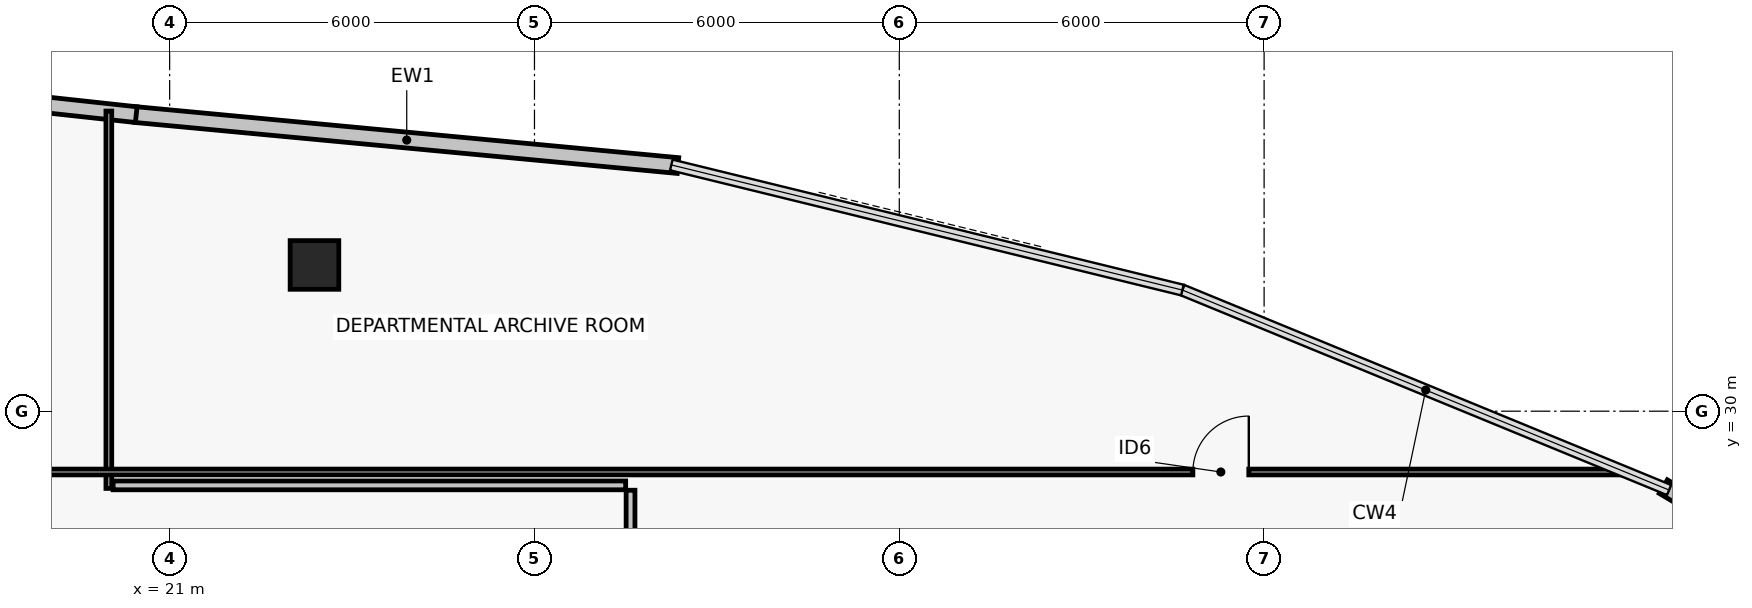
"""IFC4 building model, lengths in metres.
Left out: names, types, materials, properties, quantities, classifications, styles, units other than length and angle.
Written with IfcOpenShell. Run it as: python <this file> out.ifc"""

import sys

from ifc_helpers import new_model, si_unit, direction, frame, frame_2d, origin, origin_2d, place, context, subcontext, project, spatial, rectangle, hollow_rectangle, extrude, element, fill, save


model = new_model("IFC4")
c1 = context("Model", 3, precision=1e-05, world=origin(), true_north=direction((0.0, 1.0)))
c2 = subcontext(c1, "Body", "Model", "MODEL_VIEW")
j1 = project(units=[si_unit("LENGTHUNIT", "METRE"), si_unit("PLANEANGLEUNIT", "RADIAN")], contexts=[c1])
p1 = place(None, origin())
s1 = spatial("IfcSite", under=j1, at=p1, CompositionType="ELEMENT")
p2 = place(p1, origin())
s2 = spatial("IfcBuilding", under=s1, at=p2, CompositionType="ELEMENT")
p3 = place(p2, frame((0.0, 0.0, 234.42)))
s3 = spatial("IfcBuildingStorey", under=s2, at=p3, CompositionType="ELEMENT", Elevation=234.42)
p4 = place(p3, frame((23.382, 32.405, 0.0), z_axis=(0.0, 0.0, 1.0), x_axis=(1.0, 0.0, 0.0)))
e1 = element("IfcColumn", 1, at=p4, inside=s3, PredefinedType="COLUMN", context=c2, shape_type="SweptSolid", body=[
    extrude(hollow_rectangle(XDim=0.8, YDim=0.8, WallThickness=0.035, at=origin_2d()), origin(), (0.0, 0.0, 1.0), 3.72),
])
p5 = place(p3, frame((45.566, 28.76, 0.0), z_axis=(0.0, 0.0, 1.0), x_axis=(0.859615449495, -0.510941561227, 0.0)))
e2 = element("IfcWall", 2, at=p5, inside=s3, PredefinedType="PARTITIONING", context=c2, shape_type="SweptSolid", body=[
    extrude(rectangle(XDim=8.961, YDim=0.26, at=frame_2d((4.48, 0.0))), origin(), (0.0, 0.0, 1.0), 3.44),
])
p6 = place(p3, frame((20.438, 34.878, 0.0), z_axis=(0.0, 0.0, 1.0), x_axis=(0.995616246459, -0.093532292754, 0.0)))
e3 = element("IfcWall", 3, at=p6, inside=s3, PredefinedType="PARTITIONING", context=c2, shape_type="SweptSolid", body=[
    extrude(rectangle(XDim=8.961, YDim=0.26, at=frame_2d((4.48, 0.0))), origin(), (0.0, 0.0, 1.0), 3.44),
])
p7 = place(p3, frame((15.417, 35.423, 0.0), z_axis=(0.0, 0.0, 1.0), x_axis=(0.994158757437, -0.107927591518, 0.0)))
e4 = element("IfcWall", 4, at=p7, inside=s3, PredefinedType="PARTITIONING", context=c2, shape_type="SweptSolid", body=[
    extrude(rectangle(XDim=5.062, YDim=0.26, at=frame_2d((2.531, 0.0))), origin(), (0.0, 0.0, 1.0), 3.44),
])
p8 = place(p3, frame((28.58, 27.22, 0.0), z_axis=(0.0, 0.0, 1.0), x_axis=(0.0, 1.0, 0.0)))
e5 = element("IfcWall", 5, at=p8, inside=s3, PredefinedType="PARTITIONING", context=c2, shape_type="SweptSolid", body=[
    extrude(rectangle(XDim=1.48, YDim=0.145, at=frame_2d((0.74, 0.0))), origin(), (0.0, 0.0, 1.0), 2.57),
])
p9 = place(p3, frame((28.5, 28.78, 0.0), z_axis=(0.0, 0.0, 1.0), x_axis=(-1.0, 0.0, 0.0)))
e6 = element("IfcWall", 6, at=p9, inside=s3, PredefinedType="PARTITIONING", context=c2, shape_type="SweptSolid", body=[
    extrude(rectangle(XDim=8.43, YDim=0.145, at=frame_2d((4.215, 0.0))), origin(), (0.0, 0.0, 1.0), 2.72),
])
p10 = place(p3, frame((20.0, 28.73, 0.0), z_axis=(0.0, 0.0, 1.0), x_axis=(0.0, 1.0, 0.0)))
e7 = element("IfcWall", 7, at=p10, inside=s3, PredefinedType="PARTITIONING", context=c2, shape_type="SweptSolid", body=[
    extrude(rectangle(XDim=6.206, YDim=0.095, at=frame_2d((3.103, 0.0))), origin(), (0.0, 0.0, 1.0), 2.92),
])
p11 = place(p3, frame((17.49, 29.0, 0.0), z_axis=(0.0, 0.0, 1.0), x_axis=(1.0, 0.0, 0.0)))
e8 = element("IfcWall", 8, at=p11, inside=s3, PredefinedType="PARTITIONING", context=c2, shape_type="SweptSolid", body=[
    extrude(rectangle(XDim=27.475, YDim=0.095, at=frame_2d((13.737, 0.0))), origin(), (0.0, 0.0, 1.0), 2.72),
])
p12 = place(p11, frame((20.338, 0.0, 0.0)))
e9 = element("IfcOpeningElement", 9, at=p12, cuts=e8, PredefinedType="OPENING", context=c2, shape_type="SweptSolid", body=[
    extrude(rectangle(XDim=0.92, YDim=2.05, at=frame_2d((0.46, 1.025))), frame((0.0, 0.057, 0.0), z_axis=(0.0, -1.0, 0.0), x_axis=(1.0, 0.0, 0.0)), (0.0, 0.0, 1.0), 0.115),
])
p13 = place(p12, origin())
e10 = element("IfcDoor", 10, at=p13, inside=s3, OperationType="SINGLE_SWING_RIGHT", PredefinedType="DOOR", context=c2, shape_type="SweptSolid", body=[
    extrude(rectangle(XDim=0.92, YDim=2.05, at=frame_2d((0.46, 1.025))), frame((0.0, 0.025, 0.0), z_axis=(0.0, -1.0, 0.0), x_axis=(1.0, 0.0, 0.0)), (0.0, 0.0, 1.0), 0.05),
])
fill(e9, e10)
save(model, sys.argv[1])
